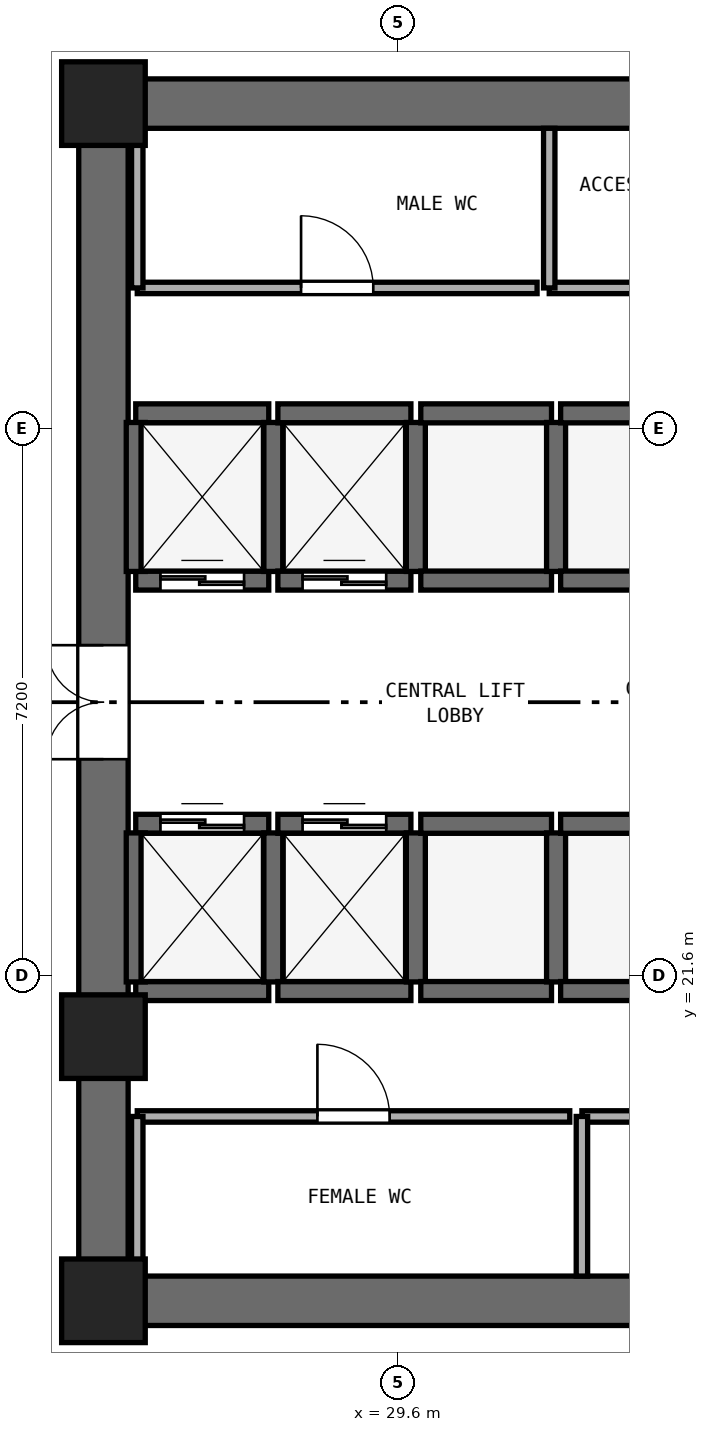
"""IFC4 building model, lengths in metres.
Left out: names, types, materials, properties, quantities, classifications, styles, units other than length and angle.
Written with IfcOpenShell. Run it as: python <this file> out.ifc"""

import sys

from ifc_helpers import new_model, si_unit, direction, frame, frame_2d, origin, origin_2d, place, context, subcontext, project, spatial, rectangle, extrude, element, fill, save


model = new_model("IFC4")
c1 = context("Model", 3, precision=1e-05, world=origin(), true_north=direction((0.0, 1.0)))
c2 = subcontext(c1, "Body", "Model", "MODEL_VIEW")
j1 = project(units=[si_unit("LENGTHUNIT", "METRE"), si_unit("PLANEANGLEUNIT", "RADIAN")], contexts=[c1])
p1 = place(None, origin())
s1 = spatial("IfcSite", under=j1, at=p1, CompositionType="ELEMENT")
p2 = place(p1, origin())
s2 = spatial("IfcBuilding", under=s1, at=p2, CompositionType="ELEMENT")
p3 = place(p2, frame((0.0, 0.0, 74.4)))
s3 = spatial("IfcBuildingStorey", under=s2, at=p3, CompositionType="ELEMENT", Elevation=74.4)
for number, where, z_axis, x_axis in (
    (1, (25.4, 17.325, 0.0), (0.0, 0.0, 1.0), (1.0, 0.0, 0.0)),
    (2, (25.4, 33.075, 0.0), (0.0, 0.0, 1.0), (1.0, 0.0, 0.0)),
):
    element("IfcWall", number, at=place(p3, frame(where, z_axis=z_axis, x_axis=x_axis)), inside=s3, PredefinedType="SHEAR", context=c2, shape_type="SweptSolid", body=[
        extrude(rectangle(XDim=23.2, YDim=0.65, at=frame_2d((11.6, 0.0))), origin(), (0.0, 0.0, 1.0), 3.525),
    ])
p4 = place(p3, frame((25.725, 17.65, 0.0), z_axis=(0.0, 0.0, 1.0), x_axis=(0.0, 1.0, 0.0)))
e3 = element("IfcWall", 3, at=p4, inside=s3, PredefinedType="SHEAR", context=c2, shape_type="SweptSolid", body=[
    extrude(rectangle(XDim=15.1, YDim=0.65, at=frame_2d((7.55, 0.0))), origin(), (0.0, 0.0, 1.0), 3.525),
])
p5 = place(p4, frame((6.8, 0.0, 0.0)))
e4 = element("IfcOpeningElement", 4, at=p5, cuts=e3, PredefinedType="OPENING", context=c2, shape_type="SweptSolid", body=[
    extrude(rectangle(XDim=1.5, YDim=2.15, at=frame_2d((0.75, 1.075))), frame((0.0, 0.335, 0.0), z_axis=(0.0, -1.0, 0.0), x_axis=(1.0, 0.0, 0.0)), (0.0, 0.0, 1.0), 0.67),
])
for number, where, z_axis, x_axis in (
    (5, (25.725, 17.325, 0.0), (0.0, 0.0, 1.0), (1.0, 0.0, 0.0)),
    (6, (25.725, 33.075, 0.0), (0.0, 0.0, 1.0), (1.0, 0.0, 0.0)),
    (7, (25.725, 20.8, 0.0), (0.0, 0.0, 1.0), (1.0, 0.0, 0.0)),
):
    element("IfcColumn", number, at=place(p3, frame(where, z_axis=z_axis, x_axis=x_axis)), inside=s3, PredefinedType="PILASTER", context=c2, shape_type="SweptSolid", body=[
        extrude(rectangle(XDim=1.1, YDim=1.1, at=origin_2d()), origin(), (0.0, 0.0, 1.0), 3.8),
    ])
p6 = place(p3, frame((26.15, 26.8, 0.0), z_axis=(0.0, 0.0, 1.0), x_axis=(1.0, 0.0, 0.0)))
e8 = element("IfcWall", 8, at=p6, inside=s3, PredefinedType="SHEAR", context=c2, shape_type="SweptSolid", body=[
    extrude(rectangle(XDim=1.75, YDim=0.25, at=frame_2d((0.875, 0.0))), origin(), (0.0, 0.0, 1.0), 3.525),
])
p7 = place(p6, frame((0.325, 0.0, 0.0)))
e9 = element("IfcOpeningElement", 9, at=p7, cuts=e8, PredefinedType="OPENING", context=c2, shape_type="SweptSolid", body=[
    extrude(rectangle(XDim=1.1, YDim=2.15, at=frame_2d((0.55, 1.075))), frame((0.0, 0.135, 0.0), z_axis=(0.0, -1.0, 0.0), x_axis=(1.0, 0.0, 0.0)), (0.0, 0.0, 1.0), 0.27),
])
p8 = place(p3, frame((26.15, 29.0, 0.0), z_axis=(0.0, 0.0, 1.0), x_axis=(1.0, 0.0, 0.0)))
e10 = element("IfcWall", 10, at=p8, inside=s3, PredefinedType="SHEAR", context=c2, shape_type="SweptSolid", body=[
    extrude(rectangle(XDim=1.75, YDim=0.25, at=frame_2d((0.875, 0.0))), origin(), (0.0, 0.0, 1.0), 3.525),
])
for number, where, z_axis, x_axis in (
    (11, (26.15, 26.92, 0.0), (0.0, 0.0, 1.0), (0.0, 1.0, 0.0)),
    (12, (27.96, 26.92, 0.0), (0.0, 0.0, 1.0), (0.0, 1.0, 0.0)),
):
    element("IfcWall", number, at=place(p3, frame(where, z_axis=z_axis, x_axis=x_axis)), inside=s3, PredefinedType="SHEAR", context=c2, shape_type="SweptSolid", body=[
        extrude(rectangle(XDim=1.96, YDim=0.25, at=frame_2d((0.98, 0.0))), origin(), (0.0, 0.0, 1.0), 3.525),
    ])
p9 = place(p3, frame((28.02, 26.8, 0.0), z_axis=(0.0, 0.0, 1.0), x_axis=(1.0, 0.0, 0.0)))
e13 = element("IfcWall", 13, at=p9, inside=s3, PredefinedType="SHEAR", context=c2, shape_type="SweptSolid", body=[
    extrude(rectangle(XDim=1.75, YDim=0.25, at=frame_2d((0.875, 0.0))), origin(), (0.0, 0.0, 1.0), 3.525),
])
p10 = place(p9, frame((0.325, 0.0, 0.0)))
e14 = element("IfcOpeningElement", 14, at=p10, cuts=e13, PredefinedType="OPENING", context=c2, shape_type="SweptSolid", body=[
    extrude(rectangle(XDim=1.1, YDim=2.15, at=frame_2d((0.55, 1.075))), frame((0.0, 0.135, 0.0), z_axis=(0.0, -1.0, 0.0), x_axis=(1.0, 0.0, 0.0)), (0.0, 0.0, 1.0), 0.27),
])
p11 = place(p3, frame((28.02, 29.0, 0.0), z_axis=(0.0, 0.0, 1.0), x_axis=(1.0, 0.0, 0.0)))
e15 = element("IfcWall", 15, at=p11, inside=s3, PredefinedType="SHEAR", context=c2, shape_type="SweptSolid", body=[
    extrude(rectangle(XDim=1.75, YDim=0.25, at=frame_2d((0.875, 0.0))), origin(), (0.0, 0.0, 1.0), 3.525),
])
p12 = place(p3, frame((29.835, 26.92, 0.0), z_axis=(0.0, 0.0, 1.0), x_axis=(0.0, 1.0, 0.0)))
e16 = element("IfcWall", 16, at=p12, inside=s3, PredefinedType="SHEAR", context=c2, shape_type="SweptSolid", body=[
    extrude(rectangle(XDim=1.96, YDim=0.25, at=frame_2d((0.98, 0.0))), origin(), (0.0, 0.0, 1.0), 3.525),
])
p13 = place(p3, frame((26.15, 21.4, 0.0), z_axis=(0.0, 0.0, 1.0), x_axis=(1.0, 0.0, 0.0)))
e17 = element("IfcWall", 17, at=p13, inside=s3, PredefinedType="SHEAR", context=c2, shape_type="SweptSolid", body=[
    extrude(rectangle(XDim=1.75, YDim=0.25, at=frame_2d((0.875, 0.0))), origin(), (0.0, 0.0, 1.0), 3.525),
])
p14 = place(p3, frame((26.15, 23.6, 0.0), z_axis=(0.0, 0.0, 1.0), x_axis=(1.0, 0.0, 0.0)))
e18 = element("IfcWall", 18, at=p14, inside=s3, PredefinedType="SHEAR", context=c2, shape_type="SweptSolid", body=[
    extrude(rectangle(XDim=1.75, YDim=0.25, at=frame_2d((0.875, 0.0))), origin(), (0.0, 0.0, 1.0), 3.525),
])
p15 = place(p14, frame((0.325, 0.0, 0.0)))
e19 = element("IfcOpeningElement", 19, at=p15, cuts=e18, PredefinedType="OPENING", context=c2, shape_type="SweptSolid", body=[
    extrude(rectangle(XDim=1.1, YDim=2.15, at=frame_2d((0.55, 1.075))), frame((0.0, 0.135, 0.0), z_axis=(0.0, -1.0, 0.0), x_axis=(1.0, 0.0, 0.0)), (0.0, 0.0, 1.0), 0.27),
])
for number, where, z_axis, x_axis in (
    (20, (26.15, 21.52, 0.0), (0.0, 0.0, 1.0), (0.0, 1.0, 0.0)),
    (21, (27.96, 21.52, 0.0), (0.0, 0.0, 1.0), (0.0, 1.0, 0.0)),
):
    element("IfcWall", number, at=place(p3, frame(where, z_axis=z_axis, x_axis=x_axis)), inside=s3, PredefinedType="SHEAR", context=c2, shape_type="SweptSolid", body=[
        extrude(rectangle(XDim=1.96, YDim=0.25, at=frame_2d((0.98, 0.0))), origin(), (0.0, 0.0, 1.0), 3.525),
    ])
p16 = place(p3, frame((28.02, 21.4, 0.0), z_axis=(0.0, 0.0, 1.0), x_axis=(1.0, 0.0, 0.0)))
e22 = element("IfcWall", 22, at=p16, inside=s3, PredefinedType="SHEAR", context=c2, shape_type="SweptSolid", body=[
    extrude(rectangle(XDim=1.75, YDim=0.25, at=frame_2d((0.875, 0.0))), origin(), (0.0, 0.0, 1.0), 3.525),
])
p17 = place(p3, frame((28.02, 23.6, 0.0), z_axis=(0.0, 0.0, 1.0), x_axis=(1.0, 0.0, 0.0)))
e23 = element("IfcWall", 23, at=p17, inside=s3, PredefinedType="SHEAR", context=c2, shape_type="SweptSolid", body=[
    extrude(rectangle(XDim=1.75, YDim=0.25, at=frame_2d((0.875, 0.0))), origin(), (0.0, 0.0, 1.0), 3.525),
])
p18 = place(p17, frame((0.325, 0.0, 0.0)))
e24 = element("IfcOpeningElement", 24, at=p18, cuts=e23, PredefinedType="OPENING", context=c2, shape_type="SweptSolid", body=[
    extrude(rectangle(XDim=1.1, YDim=2.15, at=frame_2d((0.55, 1.075))), frame((0.0, 0.135, 0.0), z_axis=(0.0, -1.0, 0.0), x_axis=(1.0, 0.0, 0.0)), (0.0, 0.0, 1.0), 0.27),
])
p19 = place(p3, frame((29.835, 21.52, 0.0), z_axis=(0.0, 0.0, 1.0), x_axis=(0.0, 1.0, 0.0)))
e25 = element("IfcWall", 25, at=p19, inside=s3, PredefinedType="SHEAR", context=c2, shape_type="SweptSolid", body=[
    extrude(rectangle(XDim=1.96, YDim=0.25, at=frame_2d((0.98, 0.0))), origin(), (0.0, 0.0, 1.0), 3.525),
])
for number, where, z_axis, x_axis in (
    (26, (29.9, 21.4, 0.0), (0.0, 0.0, 1.0), (1.0, 0.0, 0.0)),
    (27, (29.9, 23.6, 0.0), (0.0, 0.0, 1.0), (1.0, 0.0, 0.0)),
):
    element("IfcWall", number, at=place(p3, frame(where, z_axis=z_axis, x_axis=x_axis)), inside=s3, PredefinedType="SHEAR", context=c2, shape_type="SweptSolid", body=[
        extrude(rectangle(XDim=1.72, YDim=0.25, at=frame_2d((0.86, 0.0))), origin(), (0.0, 0.0, 1.0), 3.525),
    ])
p20 = place(p3, frame((31.68, 21.52, 0.0), z_axis=(0.0, 0.0, 1.0), x_axis=(0.0, 1.0, 0.0)))
e28 = element("IfcWall", 28, at=p20, inside=s3, PredefinedType="SHEAR", context=c2, shape_type="SweptSolid", body=[
    extrude(rectangle(XDim=1.96, YDim=0.25, at=frame_2d((0.98, 0.0))), origin(), (0.0, 0.0, 1.0), 3.525),
])
for number, where, z_axis, x_axis in (
    (29, (31.74, 21.4, 0.0), (0.0, 0.0, 1.0), (1.0, 0.0, 0.0)),
    (30, (31.74, 23.6, 0.0), (0.0, 0.0, 1.0), (1.0, 0.0, 0.0)),
):
    element("IfcWall", number, at=place(p3, frame(where, z_axis=z_axis, x_axis=x_axis)), inside=s3, PredefinedType="SHEAR", context=c2, shape_type="SweptSolid", body=[
        extrude(rectangle(XDim=1.72, YDim=0.25, at=frame_2d((0.86, 0.0))), origin(), (0.0, 0.0, 1.0), 3.525),
    ])
for number, where, z_axis, x_axis in (
    (31, (29.9, 26.8, 0.0), (0.0, 0.0, 1.0), (1.0, 0.0, 0.0)),
    (32, (29.9, 29.0, 0.0), (0.0, 0.0, 1.0), (1.0, 0.0, 0.0)),
):
    element("IfcWall", number, at=place(p3, frame(where, z_axis=z_axis, x_axis=x_axis)), inside=s3, PredefinedType="SHEAR", context=c2, shape_type="SweptSolid", body=[
        extrude(rectangle(XDim=1.72, YDim=0.25, at=frame_2d((0.86, 0.0))), origin(), (0.0, 0.0, 1.0), 3.525),
    ])
p21 = place(p3, frame((31.68, 26.92, 0.0), z_axis=(0.0, 0.0, 1.0), x_axis=(0.0, 1.0, 0.0)))
e33 = element("IfcWall", 33, at=p21, inside=s3, PredefinedType="SHEAR", context=c2, shape_type="SweptSolid", body=[
    extrude(rectangle(XDim=1.96, YDim=0.25, at=frame_2d((0.98, 0.0))), origin(), (0.0, 0.0, 1.0), 3.525),
])
for number, where, z_axis, x_axis in (
    (34, (31.74, 26.8, 0.0), (0.0, 0.0, 1.0), (1.0, 0.0, 0.0)),
    (35, (31.74, 29.0, 0.0), (0.0, 0.0, 1.0), (1.0, 0.0, 0.0)),
):
    element("IfcWall", number, at=place(p3, frame(where, z_axis=z_axis, x_axis=x_axis)), inside=s3, PredefinedType="SHEAR", context=c2, shape_type="SweptSolid", body=[
        extrude(rectangle(XDim=1.72, YDim=0.25, at=frame_2d((0.86, 0.0))), origin(), (0.0, 0.0, 1.0), 3.525),
    ])
p22 = place(p3, frame((26.17, 30.65, 0.0), z_axis=(0.0, 0.0, 1.0), x_axis=(1.0, 0.0, 0.0)))
e36 = element("IfcWall", 36, at=p22, inside=s3, PredefinedType="PARTITIONING", context=c2, shape_type="SweptSolid", body=[
    extrude(rectangle(XDim=5.26, YDim=0.15, at=frame_2d((2.63, 0.0))), origin(), (0.0, 0.0, 1.0), 3.525),
])
p23 = place(p22, frame((2.155, 0.0, 0.0)))
e37 = element("IfcOpeningElement", 37, at=p23, cuts=e36, PredefinedType="OPENING", context=c2, shape_type="SweptSolid", body=[
    extrude(rectangle(XDim=0.95, YDim=2.1, at=frame_2d((0.475, 1.05))), frame((0.0, 0.085, 0.0), z_axis=(0.0, -1.0, 0.0), x_axis=(1.0, 0.0, 0.0)), (0.0, 0.0, 1.0), 0.17),
])
p24 = place(p3, frame((26.17, 30.65, 0.0), z_axis=(0.0, 0.0, 1.0), x_axis=(0.0, 1.0, 0.0)))
e38 = element("IfcWall", 38, at=p24, inside=s3, PredefinedType="PARTITIONING", context=c2, shape_type="SweptSolid", body=[
    extrude(rectangle(XDim=2.1, YDim=0.15, at=frame_2d((1.05, 0.0))), origin(), (0.0, 0.0, 1.0), 3.525),
])
p25 = place(p3, frame((31.59, 30.65, 0.0), z_axis=(0.0, 0.0, 1.0), x_axis=(1.0, 0.0, 0.0)))
e39 = element("IfcWall", 39, at=p25, inside=s3, PredefinedType="PARTITIONING", context=c2, shape_type="SweptSolid", body=[
    extrude(rectangle(XDim=5.26, YDim=0.15, at=frame_2d((2.63, 0.0))), origin(), (0.0, 0.0, 1.0), 3.525),
])
p26 = place(p25, frame((2.155, 0.0, 0.0)))
e40 = element("IfcOpeningElement", 40, at=p26, cuts=e39, PredefinedType="OPENING", context=c2, shape_type="SweptSolid", body=[
    extrude(rectangle(XDim=0.95, YDim=2.1, at=frame_2d((0.475, 1.05))), frame((0.0, 0.085, 0.0), z_axis=(0.0, -1.0, 0.0), x_axis=(1.0, 0.0, 0.0)), (0.0, 0.0, 1.0), 0.17),
])
p27 = place(p3, frame((31.59, 30.65, 0.0), z_axis=(0.0, 0.0, 1.0), x_axis=(0.0, 1.0, 0.0)))
e41 = element("IfcWall", 41, at=p27, inside=s3, PredefinedType="PARTITIONING", context=c2, shape_type="SweptSolid", body=[
    extrude(rectangle(XDim=2.1, YDim=0.15, at=frame_2d((1.05, 0.0))), origin(), (0.0, 0.0, 1.0), 3.525),
])
p28 = place(p3, frame((26.17, 19.75, 0.0), z_axis=(0.0, 0.0, 1.0), x_axis=(1.0, 0.0, 0.0)))
e42 = element("IfcWall", 42, at=p28, inside=s3, PredefinedType="PARTITIONING", context=c2, shape_type="SweptSolid", body=[
    extrude(rectangle(XDim=5.69, YDim=0.15, at=frame_2d((2.845, 0.0))), origin(), (0.0, 0.0, 1.0), 3.525),
])
p29 = place(p28, frame((2.37, 0.0, 0.0)))
e43 = element("IfcOpeningElement", 43, at=p29, cuts=e42, PredefinedType="OPENING", context=c2, shape_type="SweptSolid", body=[
    extrude(rectangle(XDim=0.95, YDim=2.1, at=frame_2d((0.475, 1.05))), frame((0.0, 0.085, 0.0), z_axis=(0.0, -1.0, 0.0), x_axis=(1.0, 0.0, 0.0)), (0.0, 0.0, 1.0), 0.17),
])
p30 = place(p3, frame((26.17, 17.65, 0.0), z_axis=(0.0, 0.0, 1.0), x_axis=(0.0, 1.0, 0.0)))
e44 = element("IfcWall", 44, at=p30, inside=s3, PredefinedType="PARTITIONING", context=c2, shape_type="SweptSolid", body=[
    extrude(rectangle(XDim=2.1, YDim=0.15, at=frame_2d((1.05, 0.0))), origin(), (0.0, 0.0, 1.0), 3.525),
])
p31 = place(p3, frame((32.02, 19.75, 0.0), z_axis=(0.0, 0.0, 1.0), x_axis=(1.0, 0.0, 0.0)))
e45 = element("IfcWall", 45, at=p31, inside=s3, PredefinedType="PARTITIONING", context=c2, shape_type="SweptSolid", body=[
    extrude(rectangle(XDim=4.83, YDim=0.15, at=frame_2d((2.415, 0.0))), origin(), (0.0, 0.0, 1.0), 3.525),
])
p32 = place(p31, frame((1.965, 0.0, 0.0)))
e46 = element("IfcOpeningElement", 46, at=p32, cuts=e45, PredefinedType="OPENING", context=c2, shape_type="SweptSolid", body=[
    extrude(rectangle(XDim=0.9, YDim=2.1, at=frame_2d((0.45, 1.05))), frame((0.0, 0.085, 0.0), z_axis=(0.0, -1.0, 0.0), x_axis=(1.0, 0.0, 0.0)), (0.0, 0.0, 1.0), 0.17),
])
p33 = place(p3, frame((32.02, 17.65, 0.0), z_axis=(0.0, 0.0, 1.0), x_axis=(0.0, 1.0, 0.0)))
e47 = element("IfcWall", 47, at=p33, inside=s3, PredefinedType="PARTITIONING", context=c2, shape_type="SweptSolid", body=[
    extrude(rectangle(XDim=2.1, YDim=0.15, at=frame_2d((1.05, 0.0))), origin(), (0.0, 0.0, 1.0), 3.525),
])
p34 = place(p7, origin())
e48 = element("IfcDoor", 48, at=p34, inside=s3, OperationType="DOUBLE_DOOR_SLIDING", PredefinedType="DOOR", context=c2, shape_type="SweptSolid", body=[
    extrude(rectangle(XDim=1.1, YDim=2.15, at=frame_2d((0.55, 1.075))), frame((0.0, 0.025, 0.0), z_axis=(0.0, -1.0, 0.0), x_axis=(1.0, 0.0, 0.0)), (0.0, 0.0, 1.0), 0.05),
])
fill(e9, e48)
p35 = place(p10, origin())
e49 = element("IfcDoor", 49, at=p35, inside=s3, OperationType="DOUBLE_DOOR_SLIDING", PredefinedType="DOOR", context=c2, shape_type="SweptSolid", body=[
    extrude(rectangle(XDim=1.1, YDim=2.15, at=frame_2d((0.55, 1.075))), frame((0.0, 0.025, 0.0), z_axis=(0.0, -1.0, 0.0), x_axis=(1.0, 0.0, 0.0)), (0.0, 0.0, 1.0), 0.05),
])
fill(e14, e49)
p36 = place(p15, origin())
e50 = element("IfcDoor", 50, at=p36, inside=s3, OperationType="DOUBLE_DOOR_SLIDING", PredefinedType="DOOR", context=c2, shape_type="SweptSolid", body=[
    extrude(rectangle(XDim=1.1, YDim=2.15, at=frame_2d((0.55, 1.075))), frame((0.0, 0.025, 0.0), z_axis=(0.0, -1.0, 0.0), x_axis=(1.0, 0.0, 0.0)), (0.0, 0.0, 1.0), 0.05),
])
fill(e19, e50)
p37 = place(p18, origin())
e51 = element("IfcDoor", 51, at=p37, inside=s3, OperationType="DOUBLE_DOOR_SLIDING", PredefinedType="DOOR", context=c2, shape_type="SweptSolid", body=[
    extrude(rectangle(XDim=1.1, YDim=2.15, at=frame_2d((0.55, 1.075))), frame((0.0, 0.025, 0.0), z_axis=(0.0, -1.0, 0.0), x_axis=(1.0, 0.0, 0.0)), (0.0, 0.0, 1.0), 0.05),
])
fill(e24, e51)
p38 = place(p5, origin())
e52 = element("IfcDoor", 52, at=p38, inside=s3, OperationType="DOUBLE_DOOR_SINGLE_SWING", PredefinedType="DOOR", context=c2, shape_type="SweptSolid", body=[
    extrude(rectangle(XDim=1.5, YDim=2.15, at=frame_2d((0.75, 1.075))), frame((0.0, 0.025, 0.0), z_axis=(0.0, -1.0, 0.0), x_axis=(1.0, 0.0, 0.0)), (0.0, 0.0, 1.0), 0.05),
])
fill(e4, e52)
p39 = place(p23, origin())
e53 = element("IfcDoor", 53, at=p39, inside=s3, OperationType="SINGLE_SWING_LEFT", PredefinedType="DOOR", context=c2, shape_type="SweptSolid", body=[
    extrude(rectangle(XDim=0.95, YDim=2.1, at=frame_2d((0.475, 1.05))), frame((0.0, 0.025, 0.0), z_axis=(0.0, -1.0, 0.0), x_axis=(1.0, 0.0, 0.0)), (0.0, 0.0, 1.0), 0.05),
])
fill(e37, e53)
p40 = place(p29, origin())
e54 = element("IfcDoor", 54, at=p40, inside=s3, OperationType="SINGLE_SWING_LEFT", PredefinedType="DOOR", context=c2, shape_type="SweptSolid", body=[
    extrude(rectangle(XDim=0.95, YDim=2.1, at=frame_2d((0.475, 1.05))), frame((0.0, 0.025, 0.0), z_axis=(0.0, -1.0, 0.0), x_axis=(1.0, 0.0, 0.0)), (0.0, 0.0, 1.0), 0.05),
])
fill(e43, e54)
save(model, sys.argv[1])
